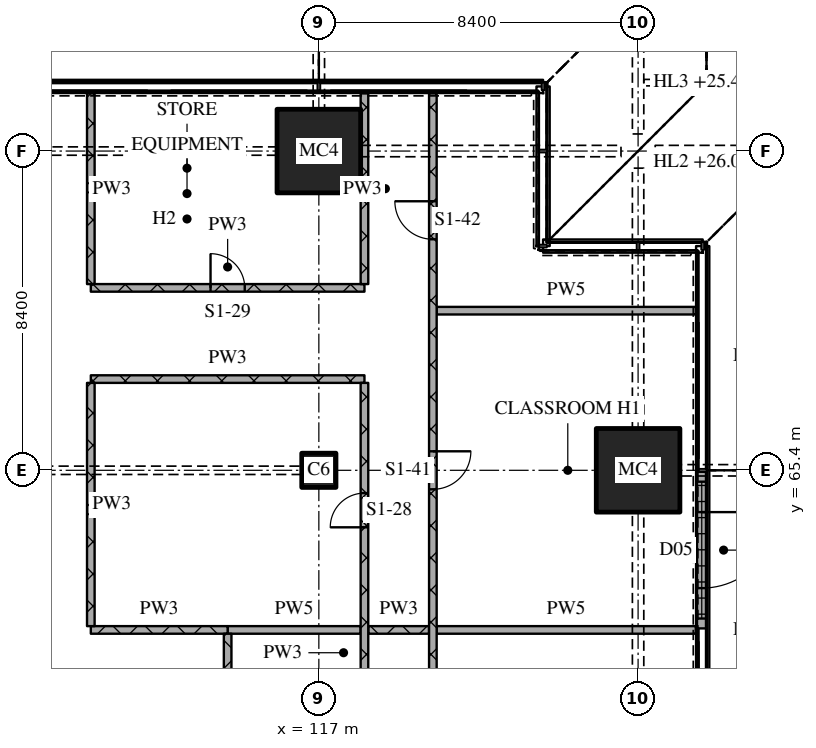
"""IFC4 building model, lengths in metres.
Left out: names, types, materials, properties, quantities, classifications, styles, units other than length and angle.
Written with IfcOpenShell. Run it as: python <this file> out.ifc"""

import sys

from ifc_helpers import new_model, si_unit, direction, frame, frame_2d, origin, origin_2d, place, context, subcontext, project, spatial, rectangle, extrude, element, fill, save


model = new_model("IFC4")
c1 = context("Model", 3, precision=1e-05, world=origin(), true_north=direction((0.0, 1.0)))
c2 = subcontext(c1, "Body", "Model", "MODEL_VIEW")
j1 = project(units=[si_unit("LENGTHUNIT", "METRE"), si_unit("PLANEANGLEUNIT", "RADIAN")], contexts=[c1])
p1 = place(None, origin())
s1 = spatial("IfcSite", under=j1, at=p1, CompositionType="ELEMENT")
p2 = place(p1, origin())
s2 = spatial("IfcBuilding", under=s1, at=p2, CompositionType="ELEMENT")
p3 = place(p2, frame((0.0, 0.0, 19.2)))
s3 = spatial("IfcBuildingStorey", under=s2, at=p3, CompositionType="ELEMENT", Elevation=19.2)
p4 = place(p3, frame((117.0, 65.4, 0.0), z_axis=(0.0, 0.0, 1.0), x_axis=(1.0, 0.0, 0.0)))
e1 = element("IfcColumn", 1, at=p4, inside=s3, PredefinedType="COLUMN", context=c2, shape_type="SweptSolid", body=[
    extrude(rectangle(XDim=0.9, YDim=0.9, at=origin_2d()), origin(), (0.0, 0.0, 1.0), 4.5),
])
for number, where, z_axis, x_axis in (
    (2, (117.0, 73.8, 0.0), (0.0, 0.0, 1.0), (1.0, 0.0, 0.0)),
    (3, (125.4, 65.4, 0.0), (0.0, 0.0, 1.0), (1.0, 0.0, 0.0)),
):
    element("IfcColumn", number, at=place(p3, frame(where, z_axis=z_axis, x_axis=x_axis)), inside=s3, PredefinedType="COLUMN", context=c2, shape_type="SweptSolid", body=[
        extrude(rectangle(XDim=2.2, YDim=2.2, at=origin_2d()), origin(), (0.0, 0.0, 1.0), 4.5),
    ])
p5 = place(p3, frame((127.075, 65.36, 0.0), z_axis=(0.0, 0.0, 1.0), x_axis=(0.0, -1.0, 0.0)))
e4 = element("IfcWall", 4, at=p5, inside=s3, PredefinedType="SOLIDWALL", context=c2, shape_type="SweptSolid", body=[
    extrude(rectangle(XDim=4.12, YDim=0.25, at=frame_2d((2.06, 0.0))), origin(), (0.0, 0.0, 1.0), 4.2),
])
p6 = place(p5, frame((1.06, 0.0, 0.0)))
e5 = element("IfcOpeningElement", 5, at=p6, cuts=e4, PredefinedType="OPENING", context=c2, shape_type="SweptSolid", body=[
    extrude(rectangle(XDim=2.0, YDim=2.4, at=frame_2d((1.0, 1.2))), frame((0.0, 0.135, 0.0), z_axis=(0.0, -1.0, 0.0), x_axis=(1.0, 0.0, 0.0)), (0.0, 0.0, 1.0), 0.27),
])
p7 = place(p5, frame((0.26, 0.0, 2.7)))
e6 = element("IfcOpeningElement", 6, at=p7, cuts=e4, PredefinedType="OPENING", context=c2, shape_type="SweptSolid", body=[
    extrude(rectangle(XDim=3.6, YDim=1.1, at=frame_2d((1.8, 0.55))), frame((0.0, 0.135, 0.0), z_axis=(0.0, -1.0, 0.0), x_axis=(1.0, 0.0, 0.0)), (0.0, 0.0, 1.0), 0.27),
])
p8 = place(p3, frame((111.0, 61.2, 0.0), z_axis=(0.0, 0.0, 1.0), x_axis=(1.0, 0.0, 0.0)))
e7 = element("IfcWall", 7, at=p8, inside=s3, PredefinedType="PARTITIONING", context=c2, shape_type="SweptSolid", body=[
    extrude(rectangle(XDim=3.6, YDim=0.2, at=frame_2d((1.8, 0.0))), origin(), (0.0, 0.0, 1.0), 4.2),
])
p9 = place(p3, frame((118.3, 61.2, 0.0), z_axis=(0.0, 0.0, 1.0), x_axis=(1.0, 0.0, 0.0)))
e8 = element("IfcWall", 8, at=p9, inside=s3, PredefinedType="PARTITIONING", context=c2, shape_type="SweptSolid", body=[
    extrude(rectangle(XDim=1.6, YDim=0.2, at=frame_2d((0.8, 0.0))), origin(), (0.0, 0.0, 1.0), 4.2),
])
p10 = place(p3, frame((114.6, 61.2, 0.0), z_axis=(0.0, 0.0, 1.0), x_axis=(1.0, 0.0, 0.0)))
e9 = element("IfcWall", 9, at=p10, inside=s3, PredefinedType="PARTITIONING", context=c2, shape_type="SweptSolid", body=[
    extrude(rectangle(XDim=3.5, YDim=0.2, at=frame_2d((1.75, 0.0))), origin(), (0.0, 0.0, 1.0), 4.2),
])
p11 = place(p3, frame((120.1, 61.2, 0.0), z_axis=(0.0, 0.0, 1.0), x_axis=(1.0, 0.0, 0.0)))
e10 = element("IfcWall", 10, at=p11, inside=s3, PredefinedType="PARTITIONING", context=c2, shape_type="SweptSolid", body=[
    extrude(rectangle(XDim=6.82, YDim=0.2, at=frame_2d((3.41, 0.0))), origin(), (0.0, 0.0, 1.0), 4.2),
])
p12 = place(p3, frame((111.0, 67.8, 0.0), z_axis=(0.0, 0.0, 1.0), x_axis=(1.0, 0.0, 0.0)))
e11 = element("IfcWall", 11, at=p12, inside=s3, PredefinedType="PARTITIONING", context=c2, shape_type="SweptSolid", body=[
    extrude(rectangle(XDim=7.2, YDim=0.2, at=frame_2d((3.6, 0.0))), origin(), (0.0, 0.0, 1.0), 4.2),
])
p13 = place(p3, frame((120.1, 69.6, 0.0), z_axis=(0.0, 0.0, 1.0), x_axis=(1.0, 0.0, 0.0)))
e12 = element("IfcWall", 12, at=p13, inside=s3, PredefinedType="PARTITIONING", context=c2, shape_type="SweptSolid", body=[
    extrude(rectangle(XDim=6.82, YDim=0.2, at=frame_2d((3.41, 0.0))), origin(), (0.0, 0.0, 1.0), 4.2),
])
p14 = place(p3, frame((111.0, 70.2, 0.0), z_axis=(0.0, 0.0, 1.0), x_axis=(1.0, 0.0, 0.0)))
e13 = element("IfcWall", 13, at=p14, inside=s3, PredefinedType="PARTITIONING", context=c2, shape_type="SweptSolid", body=[
    extrude(rectangle(XDim=7.2, YDim=0.2, at=frame_2d((3.6, 0.0))), origin(), (0.0, 0.0, 1.0), 4.2),
])
p15 = place(p14, frame((3.15, 0.0, 0.0)))
e14 = element("IfcOpeningElement", 14, at=p15, cuts=e13, PredefinedType="OPENING", context=c2, shape_type="SweptSolid", body=[
    extrude(rectangle(XDim=0.9, YDim=2.1, at=frame_2d((0.45, 1.05))), frame((0.0, 0.11, 0.0), z_axis=(0.0, -1.0, 0.0), x_axis=(1.0, 0.0, 0.0)), (0.0, 0.0, 1.0), 0.22),
])
p16 = place(p3, frame((111.0, 67.7, 0.0), z_axis=(0.0, 0.0, 1.0), x_axis=(0.0, -1.0, 0.0)))
e15 = element("IfcWall", 15, at=p16, inside=s3, PredefinedType="PARTITIONING", context=c2, shape_type="SweptSolid", body=[
    extrude(rectangle(XDim=6.4, YDim=0.2, at=frame_2d((3.2, 0.0))), origin(), (0.0, 0.0, 1.0), 4.2),
])
p17 = place(p3, frame((111.0, 75.32, 0.0), z_axis=(0.0, 0.0, 1.0), x_axis=(0.0, -1.0, 0.0)))
e16 = element("IfcWall", 16, at=p17, inside=s3, PredefinedType="PARTITIONING", context=c2, shape_type="SweptSolid", body=[
    extrude(rectangle(XDim=5.02, YDim=0.2, at=frame_2d((2.51, 0.0))), origin(), (0.0, 0.0, 1.0), 4.2),
])
p18 = place(p3, frame((114.6, 61.1, 0.0), z_axis=(0.0, 0.0, 1.0), x_axis=(0.0, -1.0, 0.0)))
e17 = element("IfcWall", 17, at=p18, inside=s3, PredefinedType="PARTITIONING", context=c2, shape_type="SweptSolid", body=[
    extrude(rectangle(XDim=7.6, YDim=0.2, at=frame_2d((3.8, 0.0))), origin(), (0.0, 0.0, 1.0), 4.2),
])
p19 = place(p3, frame((118.2, 53.5, 0.0), z_axis=(0.0, 0.0, 1.0), x_axis=(0.0, 1.0, 0.0)))
e18 = element("IfcWall", 18, at=p19, inside=s3, PredefinedType="PARTITIONING", context=c2, shape_type="SweptSolid", body=[
    extrude(rectangle(XDim=14.2, YDim=0.2, at=frame_2d((7.1, 0.0))), origin(), (0.0, 0.0, 1.0), 4.2),
])
p20 = place(p19, frame((5.45, 0.0, 0.0)))
e19 = element("IfcOpeningElement", 19, at=p20, cuts=e18, PredefinedType="OPENING", context=c2, shape_type="SweptSolid", body=[
    extrude(rectangle(XDim=0.9, YDim=2.1, at=frame_2d((0.45, 1.05))), frame((0.0, 0.11, 0.0), z_axis=(0.0, -1.0, 0.0), x_axis=(1.0, 0.0, 0.0)), (0.0, 0.0, 1.0), 0.22),
])
p21 = place(p19, frame((10.4, 0.0, 0.0)))
e20 = element("IfcOpeningElement", 20, at=p21, cuts=e18, PredefinedType="OPENING", context=c2, shape_type="SweptSolid", body=[
    extrude(rectangle(XDim=0.9, YDim=2.1, at=frame_2d((0.45, 1.05))), frame((0.0, 0.11, 0.0), z_axis=(0.0, -1.0, 0.0), x_axis=(1.0, 0.0, 0.0)), (0.0, 0.0, 1.0), 0.22),
])
p22 = place(p3, frame((118.2, 75.32, 0.0), z_axis=(0.0, 0.0, 1.0), x_axis=(0.0, -1.0, 0.0)))
e21 = element("IfcWall", 21, at=p22, inside=s3, PredefinedType="PARTITIONING", context=c2, shape_type="SweptSolid", body=[
    extrude(rectangle(XDim=5.02, YDim=0.2, at=frame_2d((2.51, 0.0))), origin(), (0.0, 0.0, 1.0), 4.2),
])
p23 = place(p3, frame((120.0, 75.32, 0.0), z_axis=(0.0, 0.0, 1.0), x_axis=(0.0, -1.0, 0.0)))
e22 = element("IfcWall", 22, at=p23, inside=s3, PredefinedType="PARTITIONING", context=c2, shape_type="SweptSolid", body=[
    extrude(rectangle(XDim=32.02, YDim=0.2, at=frame_2d((16.01, 0.0))), origin(), (0.0, 0.0, 1.0), 4.2),
])
p24 = place(p23, frame((2.841, 0.0, 0.0)))
e23 = element("IfcOpeningElement", 23, at=p24, cuts=e22, PredefinedType="OPENING", context=c2, shape_type="SweptSolid", body=[
    extrude(rectangle(XDim=1.0, YDim=2.1, at=frame_2d((0.5, 1.05))), frame((0.0, 0.11, 0.0), z_axis=(0.0, -1.0, 0.0), x_axis=(1.0, 0.0, 0.0)), (0.0, 0.0, 1.0), 0.22),
])
p25 = place(p23, frame((9.42, 0.0, 0.0)))
e24 = element("IfcOpeningElement", 24, at=p25, cuts=e22, PredefinedType="OPENING", context=c2, shape_type="SweptSolid", body=[
    extrude(rectangle(XDim=1.0, YDim=2.1, at=frame_2d((0.5, 1.05))), frame((0.0, 0.11, 0.0), z_axis=(0.0, -1.0, 0.0), x_axis=(1.0, 0.0, 0.0)), (0.0, 0.0, 1.0), 0.22),
])
p26 = place(p23, frame((22.62, 0.0, 0.0)))
e25 = element("IfcOpeningElement", 25, at=p26, cuts=e22, PredefinedType="OPENING", context=c2, shape_type="SweptSolid", body=[
    extrude(rectangle(XDim=1.0, YDim=2.1, at=frame_2d((0.5, 1.05))), frame((0.0, 0.11, 0.0), z_axis=(0.0, -1.0, 0.0), x_axis=(1.0, 0.0, 0.0)), (0.0, 0.0, 1.0), 0.22),
])
p27 = place(p6, origin())
e26 = element("IfcDoor", 26, at=p27, inside=s3, OperationType="DOUBLE_DOOR_SINGLE_SWING", PredefinedType="DOOR", context=c2, shape_type="SweptSolid", body=[
    extrude(rectangle(XDim=2.0, YDim=2.4, at=frame_2d((1.0, 1.2))), frame((0.0, 0.025, 0.0), z_axis=(0.0, -1.0, 0.0), x_axis=(1.0, 0.0, 0.0)), (0.0, 0.0, 1.0), 0.05),
])
fill(e5, e26)
p28 = place(p7, origin())
e27 = element("IfcWindow", 27, at=p28, inside=s3, PartitioningType="SINGLE_PANEL", PredefinedType="WINDOW", context=c2, shape_type="SweptSolid", body=[
    extrude(rectangle(XDim=3.6, YDim=1.1, at=frame_2d((1.8, 0.55))), frame((0.0, 0.03, 0.0), z_axis=(0.0, -1.0, 0.0), x_axis=(1.0, 0.0, 0.0)), (0.0, 0.0, 1.0), 0.06),
])
fill(e6, e27)
p29 = place(p15, origin())
e28 = element("IfcDoor", 28, at=p29, inside=s3, OperationType="SINGLE_SWING_LEFT", PredefinedType="DOOR", context=c2, shape_type="SweptSolid", body=[
    extrude(rectangle(XDim=0.9, YDim=2.1, at=frame_2d((0.45, 1.05))), frame((0.0, 0.025, 0.0), z_axis=(0.0, -1.0, 0.0), x_axis=(1.0, 0.0, 0.0)), (0.0, 0.0, 1.0), 0.05),
])
fill(e14, e28)
p30 = place(p21, origin())
e29 = element("IfcDoor", 29, at=p30, inside=s3, OperationType="SINGLE_SWING_LEFT", PredefinedType="DOOR", context=c2, shape_type="SweptSolid", body=[
    extrude(rectangle(XDim=0.9, YDim=2.1, at=frame_2d((0.45, 1.05))), frame((0.0, 0.025, 0.0), z_axis=(0.0, -1.0, 0.0), x_axis=(1.0, 0.0, 0.0)), (0.0, 0.0, 1.0), 0.05),
])
fill(e20, e29)
p31 = place(p24, origin())
e30 = element("IfcDoor", 30, at=p31, inside=s3, OperationType="SINGLE_SWING_RIGHT", PredefinedType="DOOR", context=c2, shape_type="SweptSolid", body=[
    extrude(rectangle(XDim=1.0, YDim=2.1, at=frame_2d((0.5, 1.05))), frame((0.0, 0.025, 0.0), z_axis=(0.0, -1.0, 0.0), x_axis=(1.0, 0.0, 0.0)), (0.0, 0.0, 1.0), 0.05),
])
fill(e23, e30)
p32 = place(p25, origin())
e31 = element("IfcDoor", 31, at=p32, inside=s3, OperationType="SINGLE_SWING_LEFT", PredefinedType="DOOR", context=c2, shape_type="SweptSolid", body=[
    extrude(rectangle(XDim=1.0, YDim=2.1, at=frame_2d((0.5, 1.05))), frame((0.0, 0.025, 0.0), z_axis=(0.0, -1.0, 0.0), x_axis=(1.0, 0.0, 0.0)), (0.0, 0.0, 1.0), 0.05),
])
fill(e24, e31)
save(model, sys.argv[1])
